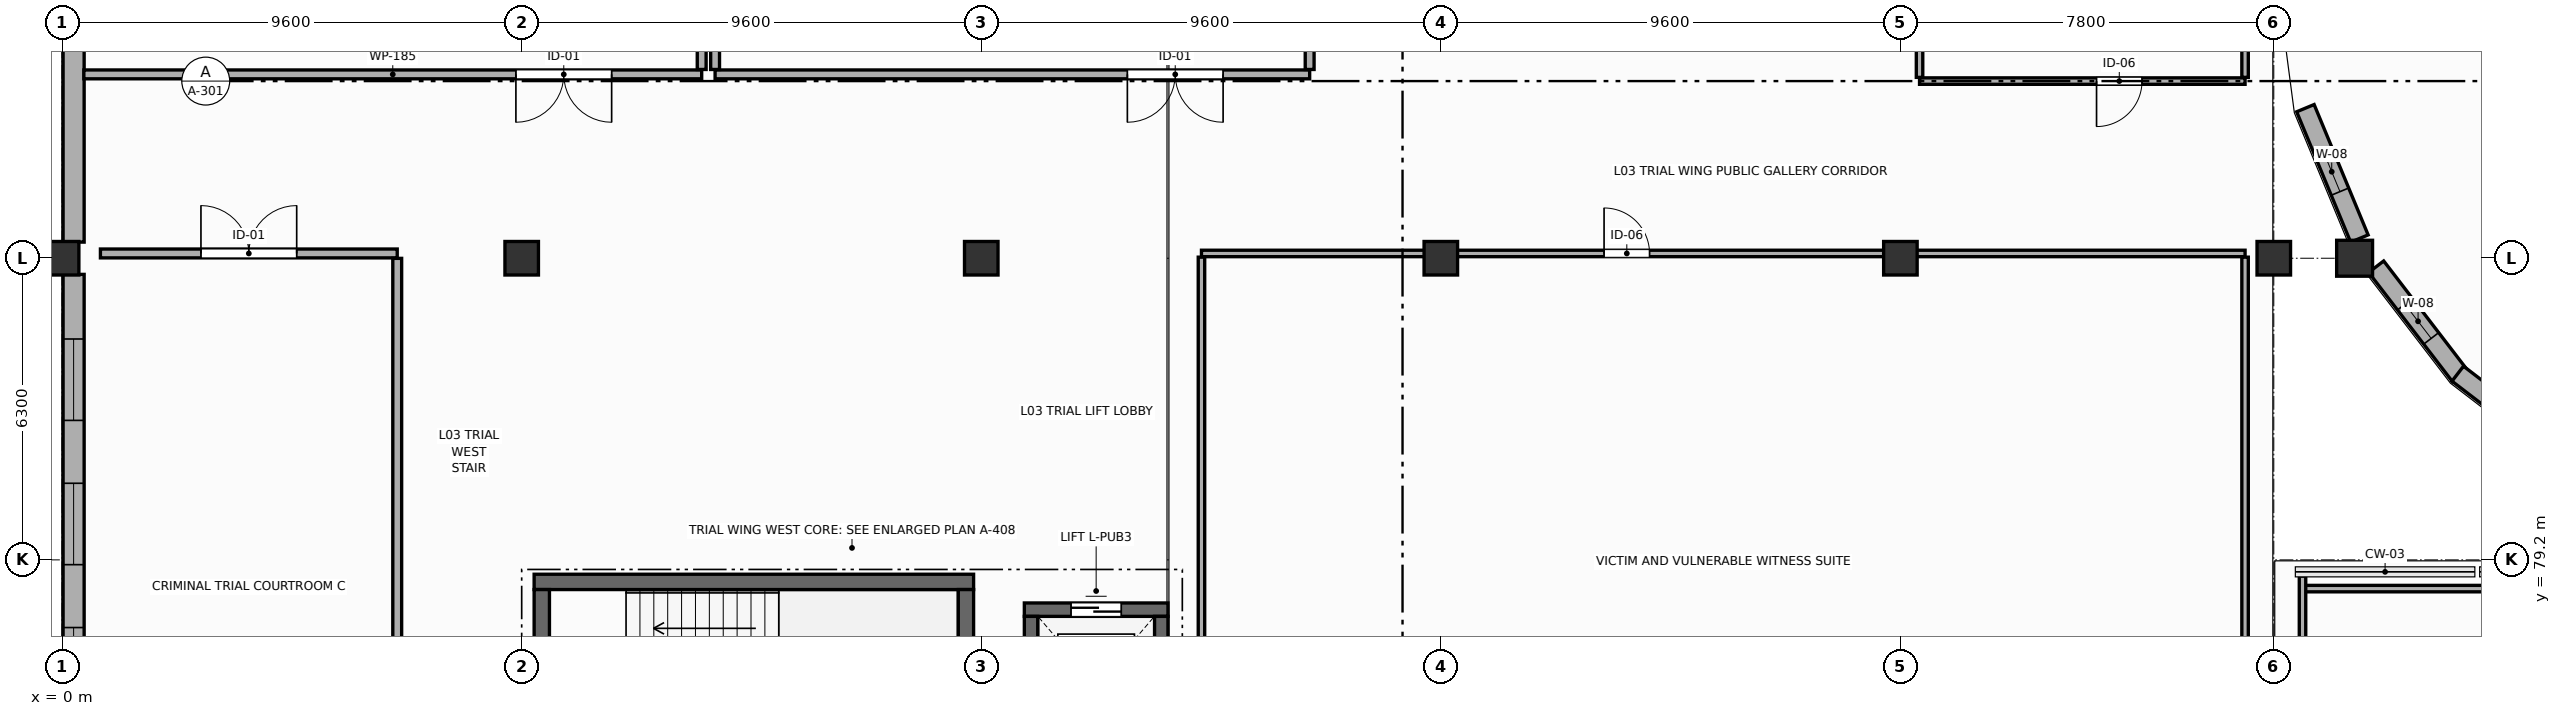
"""IFC4 building model, lengths in metres.
Left out: names, types, materials, properties, quantities, classifications, styles, units other than length and angle.
Written with IfcOpenShell. Run it as: python <this file> out.ifc"""

import sys

from ifc_helpers import new_model, si_unit, direction, frame, frame_2d, origin, origin_2d, place, context, subcontext, project, spatial, rectangle, circle, extrude, element, fill, save


model = new_model("IFC4")
c1 = context("Model", 3, precision=1e-05, world=origin(), true_north=direction((0.0, 1.0)))
c2 = subcontext(c1, "Body", "Model", "MODEL_VIEW")
j1 = project(units=[si_unit("LENGTHUNIT", "METRE"), si_unit("PLANEANGLEUNIT", "RADIAN")], contexts=[c1])
p1 = place(None, origin())
s1 = spatial("IfcSite", under=j1, at=p1, CompositionType="ELEMENT")
p2 = place(p1, origin())
s2 = spatial("IfcBuilding", under=s1, at=p2, CompositionType="ELEMENT")
p3 = place(p2, frame((0.0, 0.0, 9.9)))
s3 = spatial("IfcBuildingStorey", under=s2, at=p3, CompositionType="ELEMENT", Elevation=9.9)
p4 = place(p3, frame((47.888, 85.5, 0.0), z_axis=(0.0, 0.0, 1.0), x_axis=(1.0, 0.0, 0.0)))
e1 = element("IfcColumn", 1, at=p4, inside=s3, PredefinedType="COLUMN", context=c2, shape_type="SweptSolid", body=[
    extrude(circle(Radius=0.375, at=origin_2d()), origin(), (0.0, 0.0, 1.0), 4.5),
])
for number, where, z_axis, x_axis in (
    (2, (0.0, 85.5, 0.0), (0.0, 0.0, 1.0), (1.0, 0.0, 0.0)),
    (3, (9.6, 85.5, 0.0), (0.0, 0.0, 1.0), (1.0, 0.0, 0.0)),
    (4, (19.2, 85.5, 0.0), (0.0, 0.0, 1.0), (1.0, 0.0, 0.0)),
    (5, (28.8, 85.5, 0.0), (0.0, 0.0, 1.0), (1.0, 0.0, 0.0)),
    (6, (38.4, 85.5, 0.0), (0.0, 0.0, 1.0), (1.0, 0.0, 0.0)),
    (7, (46.2, 85.5, 0.0), (0.0, 0.0, 1.0), (1.0, 0.0, 0.0)),
):
    element("IfcColumn", number, at=place(p3, frame(where, z_axis=z_axis, x_axis=x_axis)), inside=s3, PredefinedType="COLUMN", context=c2, shape_type="SweptSolid", body=[
        extrude(rectangle(XDim=0.7, YDim=0.7, at=origin_2d()), origin(), (0.0, 0.0, 1.0), 4.5),
    ])
p5 = place(p3, frame((46.86, 88.635, 0.0), z_axis=(0.0, 0.0, 1.0), x_axis=(0.382632249505, -0.923900731485, 0.0)))
e8 = element("IfcWall", 8, at=p5, inside=s3, PredefinedType="ELEMENTEDWALL", context=c2, shape_type="SweptSolid", body=[
    extrude(rectangle(XDim=2.947, YDim=0.395, at=frame_2d((1.474, 0.0))), origin(), (0.0, 0.0, 1.0), 3.38),
])
p6 = place(p5, frame((0.987, 0.0, 0.85)))
e9 = element("IfcOpeningElement", 9, at=p6, cuts=e8, PredefinedType="OPENING", context=c2, shape_type="SweptSolid", body=[
    extrude(rectangle(XDim=0.9, YDim=1.85, at=frame_2d((0.45, 0.925))), frame((0.0, 0.208, 0.0), z_axis=(0.0, -1.0, 0.0), x_axis=(1.0, 0.0, 0.0)), (0.0, 0.0, 1.0), 0.415),
])
p7 = place(p3, frame((48.339, 85.323, 0.0), z_axis=(0.0, 0.0, 1.0), x_axis=(0.608729278603, -0.79337800913, 0.0)))
e10 = element("IfcWall", 10, at=p7, inside=s3, PredefinedType="ELEMENTEDWALL", context=c2, shape_type="SweptSolid", body=[
    extrude(rectangle(XDim=2.875, YDim=0.395, at=frame_2d((1.437, 0.0))), origin(), (0.0, 0.0, 1.0), 3.38),
])
p8 = place(p7, frame((0.987, 0.0, 0.85)))
e11 = element("IfcOpeningElement", 11, at=p8, cuts=e10, PredefinedType="OPENING", context=c2, shape_type="SweptSolid", body=[
    extrude(rectangle(XDim=0.9, YDim=1.85, at=frame_2d((0.45, 0.925))), frame((0.0, 0.208, 0.0), z_axis=(0.0, -1.0, 0.0), x_axis=(1.0, 0.0, 0.0)), (0.0, 0.0, 1.0), 0.415),
])
p9 = place(p3, frame((50.043, 83.089, 0.0), z_axis=(0.0, 0.0, 1.0), x_axis=(0.793346533164, -0.608770300127, 0.0)))
e12 = element("IfcWall", 12, at=p9, inside=s3, PredefinedType="ELEMENTEDWALL", context=c2, shape_type="SweptSolid", body=[
    extrude(rectangle(XDim=2.874, YDim=0.395, at=frame_2d((1.437, 0.0))), origin(), (0.0, 0.0, 1.0), 3.28),
])
p10 = place(p9, frame((0.987, 0.0, 0.85)))
e13 = element("IfcOpeningElement", 13, at=p10, cuts=e12, PredefinedType="OPENING", context=c2, shape_type="SweptSolid", body=[
    extrude(rectangle(XDim=0.9, YDim=1.85, at=frame_2d((0.45, 0.925))), frame((0.0, 0.208, 0.0), z_axis=(0.0, -1.0, 0.0), x_axis=(1.0, 0.0, 0.0)), (0.0, 0.0, 1.0), 0.415),
])
p11 = place(p3, frame((0.24, 74.742, 0.0), z_axis=(0.0, 0.0, 1.0), x_axis=(0.0, 1.0, 0.0)))
e14 = element("IfcWall", 14, at=p11, inside=s3, PredefinedType="STANDARD", context=c2, shape_type="SweptSolid", body=[
    extrude(rectangle(XDim=10.421, YDim=0.44, at=frame_2d((5.21, 0.0))), origin(), (0.0, 0.0, 1.0), 3.38),
])
p12 = place(p11, frame((1.345, 0.0, 0.85)))
e15 = element("IfcOpeningElement", 15, at=p12, cuts=e14, PredefinedType="OPENING", context=c2, shape_type="SweptSolid", body=[
    extrude(rectangle(XDim=1.7, YDim=2.3, at=frame_2d((0.85, 1.15))), frame((0.0, 0.23, 0.0), z_axis=(0.0, -1.0, 0.0), x_axis=(1.0, 0.0, 0.0)), (0.0, 0.0, 1.0), 0.46),
])
p13 = place(p11, frame((4.358, 0.0, 0.85)))
e16 = element("IfcOpeningElement", 16, at=p13, cuts=e14, PredefinedType="OPENING", context=c2, shape_type="SweptSolid", body=[
    extrude(rectangle(XDim=1.7, YDim=2.3, at=frame_2d((0.85, 1.15))), frame((0.0, 0.23, 0.0), z_axis=(0.0, -1.0, 0.0), x_axis=(1.0, 0.0, 0.0)), (0.0, 0.0, 1.0), 0.46),
])
p14 = place(p11, frame((7.371, 0.0, 0.85)))
e17 = element("IfcOpeningElement", 17, at=p14, cuts=e14, PredefinedType="OPENING", context=c2, shape_type="SweptSolid", body=[
    extrude(rectangle(XDim=1.7, YDim=2.3, at=frame_2d((0.85, 1.15))), frame((0.0, 0.23, 0.0), z_axis=(0.0, -1.0, 0.0), x_axis=(1.0, 0.0, 0.0)), (0.0, 0.0, 1.0), 0.46),
])
p15 = place(p3, frame((0.24, 85.837, 0.0), z_axis=(0.0, 0.0, 1.0), x_axis=(0.0, 1.0, 0.0)))
e18 = element("IfcWall", 18, at=p15, inside=s3, PredefinedType="STANDARD", context=c2, shape_type="SweptSolid", body=[
    extrude(rectangle(XDim=11.921, YDim=0.44, at=frame_2d((5.96, 0.0))), origin(), (0.0, 0.0, 1.0), 3.33),
])
p16 = place(p15, frame((5.113, 0.0, 0.85)))
e19 = element("IfcOpeningElement", 19, at=p16, cuts=e18, PredefinedType="OPENING", context=c2, shape_type="SweptSolid", body=[
    extrude(rectangle(XDim=1.7, YDim=2.3, at=frame_2d((0.85, 1.15))), frame((0.0, 0.23, 0.0), z_axis=(0.0, -1.0, 0.0), x_axis=(1.0, 0.0, 0.0)), (0.0, 0.0, 1.0), 0.46),
])
p17 = place(p15, frame((8.626, 0.0, 0.85)))
e20 = element("IfcOpeningElement", 20, at=p17, cuts=e18, PredefinedType="OPENING", context=c2, shape_type="SweptSolid", body=[
    extrude(rectangle(XDim=1.7, YDim=2.3, at=frame_2d((0.85, 1.15))), frame((0.0, 0.23, 0.0), z_axis=(0.0, -1.0, 0.0), x_axis=(1.0, 0.0, 0.0)), (0.0, 0.0, 1.0), 0.46),
])
p18 = place(p3, frame((9.86, 78.74, 0.0), z_axis=(0.0, 0.0, 1.0), x_axis=(1.0, 0.0, 0.0)))
e21 = element("IfcWall", 21, at=p18, inside=s3, PredefinedType="SHEAR", context=c2, shape_type="SweptSolid", body=[
    extrude(rectangle(XDim=9.18, YDim=0.32, at=frame_2d((4.59, 0.0))), origin(), (0.0, 0.0, 1.0), 4.25),
])
p19 = place(p3, frame((10.02, 75.18, 0.0), z_axis=(0.0, 0.0, 1.0), x_axis=(0.0, 1.0, 0.0)))
e22 = element("IfcWall", 22, at=p19, inside=s3, PredefinedType="SHEAR", context=c2, shape_type="SweptSolid", body=[
    extrude(rectangle(XDim=3.4, YDim=0.32, at=frame_2d((1.7, 0.0))), origin(), (0.0, 0.0, 1.0), 4.25),
])
p20 = place(p19, frame((1.125, 0.0, 0.0)))
e23 = element("IfcOpeningElement", 23, at=p20, cuts=e22, PredefinedType="OPENING", context=c2, shape_type="SweptSolid", body=[
    extrude(rectangle(XDim=1.15, YDim=2.2, at=frame_2d((0.575, 1.1))), frame((0.0, 0.17, 0.0), z_axis=(0.0, -1.0, 0.0), x_axis=(1.0, 0.0, 0.0)), (0.0, 0.0, 1.0), 0.34),
])
p21 = place(p3, frame((18.88, 78.58, 0.0), z_axis=(0.0, 0.0, 1.0), x_axis=(0.0, -1.0, 0.0)))
e24 = element("IfcWall", 24, at=p21, inside=s3, PredefinedType="SHEAR", context=c2, shape_type="SweptSolid", body=[
    extrude(rectangle(XDim=3.4, YDim=0.32, at=frame_2d((1.7, 0.0))), origin(), (0.0, 0.0, 1.0), 4.25),
])
p22 = place(p3, frame((20.1, 78.16, 0.0), z_axis=(0.0, 0.0, 1.0), x_axis=(1.0, 0.0, 0.0)))
e25 = element("IfcWall", 25, at=p22, inside=s3, PredefinedType="SHEAR", context=c2, shape_type="SweptSolid", body=[
    extrude(rectangle(XDim=3.0, YDim=0.28, at=frame_2d((1.5, 0.0))), origin(), (0.0, 0.0, 1.0), 4.25),
])
p23 = place(p22, frame((0.975, 0.0, 0.0)))
e26 = element("IfcOpeningElement", 26, at=p23, cuts=e25, PredefinedType="OPENING", context=c2, shape_type="SweptSolid", body=[
    extrude(rectangle(XDim=1.05, YDim=2.2, at=frame_2d((0.525, 1.1))), frame((0.0, 0.15, 0.0), z_axis=(0.0, -1.0, 0.0), x_axis=(1.0, 0.0, 0.0)), (0.0, 0.0, 1.0), 0.3),
])
for number, where, z_axis, x_axis in (
    (27, (20.24, 75.18, 0.0), (0.0, 0.0, 1.0), (0.0, 1.0, 0.0)),
    (28, (22.96, 78.02, 0.0), (0.0, 0.0, 1.0), (0.0, -1.0, 0.0)),
):
    element("IfcWall", number, at=place(p3, frame(where, z_axis=z_axis, x_axis=x_axis)), inside=s3, PredefinedType="SHEAR", context=c2, shape_type="SweptSolid", body=[
        extrude(rectangle(XDim=2.84, YDim=0.28, at=frame_2d((1.42, 0.0))), origin(), (0.0, 0.0, 1.0), 4.25),
    ])
p24 = place(p3, frame((13.36, 89.34, 0.0), z_axis=(0.0, 0.0, 1.0), x_axis=(-1.0, 0.0, 0.0)))
e29 = element("IfcWall", 29, at=p24, inside=s3, PredefinedType="PARTITIONING", context=c2, shape_type="SweptSolid", body=[
    extrude(rectangle(XDim=12.906, YDim=0.185, at=frame_2d((6.453, 0.0))), origin(), (0.0, 0.0, 1.0), 3.38),
])
p25 = place(p24, frame((1.881, 0.0, 0.0)))
e30 = element("IfcOpeningElement", 30, at=p25, cuts=e29, PredefinedType="OPENING", context=c2, shape_type="SweptSolid", body=[
    extrude(rectangle(XDim=2.0, YDim=2.5, at=frame_2d((1.0, 1.25))), frame((0.0, 0.103, 0.0), z_axis=(0.0, -1.0, 0.0), x_axis=(1.0, 0.0, 0.0)), (0.0, 0.0, 1.0), 0.205),
])
p26 = place(p3, frame((13.36, 112.346, 0.0), z_axis=(0.0, 0.0, 1.0), x_axis=(0.0, -1.0, 0.0)))
e31 = element("IfcWall", 31, at=p26, inside=s3, PredefinedType="PARTITIONING", context=c2, shape_type="SweptSolid", body=[
    extrude(rectangle(XDim=22.904, YDim=0.185, at=frame_2d((11.452, 0.0))), origin(), (0.0, 0.0, 1.0), 3.58),
])
p27 = place(p3, frame((26.06, 89.34, 0.0), z_axis=(0.0, 0.0, 1.0), x_axis=(-1.0, 0.0, 0.0)))
e32 = element("IfcWall", 32, at=p27, inside=s3, PredefinedType="PARTITIONING", context=c2, shape_type="SweptSolid", body=[
    extrude(rectangle(XDim=12.42, YDim=0.185, at=frame_2d((6.21, 0.0))), origin(), (0.0, 0.0, 1.0), 3.38),
])
p28 = place(p27, frame((1.808, 0.0, 0.0)))
e33 = element("IfcOpeningElement", 33, at=p28, cuts=e32, PredefinedType="OPENING", context=c2, shape_type="SweptSolid", body=[
    extrude(rectangle(XDim=2.0, YDim=2.5, at=frame_2d((1.0, 1.25))), frame((0.0, 0.103, 0.0), z_axis=(0.0, -1.0, 0.0), x_axis=(1.0, 0.0, 0.0)), (0.0, 0.0, 1.0), 0.205),
])
for number, where, z_axis, x_axis in (
    (34, (13.64, 89.442, 0.0), (0.0, 0.0, 1.0), (0.0, 1.0, 0.0)),
    (35, (26.06, 97.597, 0.0), (0.0, 0.0, 1.0), (0.0, -1.0, 0.0)),
):
    element("IfcWall", number, at=place(p3, frame(where, z_axis=z_axis, x_axis=x_axis)), inside=s3, PredefinedType="PARTITIONING", context=c2, shape_type="SweptSolid", body=[
        extrude(rectangle(XDim=8.155, YDim=0.185, at=frame_2d((4.078, 0.0))), origin(), (0.0, 0.0, 1.0), 3.63),
    ])
p29 = place(p3, frame((45.6, 89.2, 0.0), z_axis=(0.0, 0.0, 1.0), x_axis=(-1.0, 0.0, 0.0)))
e36 = element("IfcWall", 36, at=p29, inside=s3, PredefinedType="PARTITIONING", context=c2, shape_type="SweptSolid", body=[
    extrude(rectangle(XDim=6.8, YDim=0.135, at=frame_2d((3.4, 0.0))), origin(), (0.0, 0.0, 1.0), 3.38),
])
p30 = place(p29, frame((2.153, 0.0, 0.0)))
e37 = element("IfcOpeningElement", 37, at=p30, cuts=e36, PredefinedType="OPENING", context=c2, shape_type="SweptSolid", body=[
    extrude(rectangle(XDim=0.95, YDim=2.15, at=frame_2d((0.475, 1.075))), frame((0.0, 0.077, 0.0), z_axis=(0.0, -1.0, 0.0), x_axis=(1.0, 0.0, 0.0)), (0.0, 0.0, 1.0), 0.155),
])
p31 = place(p3, frame((38.8, 89.278, 0.0), z_axis=(0.0, 0.0, 1.0), x_axis=(0.0, 1.0, 0.0)))
e38 = element("IfcWall", 38, at=p31, inside=s3, PredefinedType="PARTITIONING", context=c2, shape_type="SweptSolid", body=[
    extrude(rectangle(XDim=12.645, YDim=0.135, at=frame_2d((6.323, 0.0))), origin(), (0.0, 0.0, 1.0), 3.33),
])
p32 = place(p3, frame((45.6, 101.923, 0.0), z_axis=(0.0, 0.0, 1.0), x_axis=(0.0, -1.0, 0.0)))
e39 = element("IfcWall", 39, at=p32, inside=s3, PredefinedType="PARTITIONING", context=c2, shape_type="SweptSolid", body=[
    extrude(rectangle(XDim=12.645, YDim=0.135, at=frame_2d((6.323, 0.0))), origin(), (0.0, 0.0, 1.0), 3.63),
])
p33 = place(p3, frame((0.8, 85.6, 0.0), z_axis=(0.0, 0.0, 1.0), x_axis=(1.0, 0.0, 0.0)))
e40 = element("IfcWall", 40, at=p33, inside=s3, PredefinedType="PARTITIONING", context=c2, shape_type="SweptSolid", body=[
    extrude(rectangle(XDim=6.2, YDim=0.185, at=frame_2d((3.1, 0.0))), origin(), (0.0, 0.0, 1.0), 3.58),
])
p34 = place(p33, frame((2.1, 0.0, 0.0)))
e41 = element("IfcOpeningElement", 41, at=p34, cuts=e40, PredefinedType="OPENING", context=c2, shape_type="SweptSolid", body=[
    extrude(rectangle(XDim=2.0, YDim=2.5, at=frame_2d((1.0, 1.25))), frame((0.0, 0.103, 0.0), z_axis=(0.0, -1.0, 0.0), x_axis=(1.0, 0.0, 0.0)), (0.0, 0.0, 1.0), 0.205),
])
p35 = place(p3, frame((7.0, 85.498, 0.0), z_axis=(0.0, 0.0, 1.0), x_axis=(0.0, -1.0, 0.0)))
e42 = element("IfcWall", 42, at=p35, inside=s3, PredefinedType="PARTITIONING", context=c2, shape_type="SweptSolid", body=[
    extrude(rectangle(XDim=17.595, YDim=0.185, at=frame_2d((8.797, 0.0))), origin(), (0.0, 0.0, 1.0), 3.58),
])
p36 = place(p3, frame((23.8, 85.6, 0.0), z_axis=(0.0, 0.0, 1.0), x_axis=(1.0, 0.0, 0.0)))
e43 = element("IfcWall", 43, at=p36, inside=s3, PredefinedType="PARTITIONING", context=c2, shape_type="SweptSolid", body=[
    extrude(rectangle(XDim=21.8, YDim=0.135, at=frame_2d((10.9, 0.0))), origin(), (0.0, 0.0, 1.0), 3.38),
])
p37 = place(p36, frame((8.41, 0.0, 0.0)))
e44 = element("IfcOpeningElement", 44, at=p37, cuts=e43, PredefinedType="OPENING", context=c2, shape_type="SweptSolid", body=[
    extrude(rectangle(XDim=0.95, YDim=2.15, at=frame_2d((0.475, 1.075))), frame((0.0, 0.077, 0.0), z_axis=(0.0, -1.0, 0.0), x_axis=(1.0, 0.0, 0.0)), (0.0, 0.0, 1.0), 0.155),
])
p38 = place(p3, frame((23.8, 67.877, 0.0), z_axis=(0.0, 0.0, 1.0), x_axis=(0.0, 1.0, 0.0)))
e45 = element("IfcWall", 45, at=p38, inside=s3, PredefinedType="PARTITIONING", context=c2, shape_type="SweptSolid", body=[
    extrude(rectangle(XDim=17.645, YDim=0.135, at=frame_2d((8.823, 0.0))), origin(), (0.0, 0.0, 1.0), 3.58),
])
p39 = place(p3, frame((45.6, 85.522, 0.0), z_axis=(0.0, 0.0, 1.0), x_axis=(0.0, -1.0, 0.0)))
e46 = element("IfcWall", 46, at=p39, inside=s3, PredefinedType="PARTITIONING", context=c2, shape_type="SweptSolid", body=[
    extrude(rectangle(XDim=18.348, YDim=0.135, at=frame_2d((9.174, 0.0))), origin(), (0.0, 0.0, 1.0), 3.68),
])
p40 = place(p3, frame((46.8, 78.6, 0.0), z_axis=(0.0, 0.0, 1.0), x_axis=(1.0, 0.0, 0.0)))
e47 = element("IfcWall", 47, at=p40, inside=s3, PredefinedType="PARTITIONING", context=c2, shape_type="SweptSolid", body=[
    extrude(rectangle(XDim=9.6, YDim=0.135, at=frame_2d((4.8, 0.0))), origin(), (0.0, 0.0, 1.0), 4.235),
])
p41 = place(p3, frame((46.8, 70.877, 0.0), z_axis=(0.0, 0.0, 1.0), x_axis=(0.0, 1.0, 0.0)))
e48 = element("IfcWall", 48, at=p41, inside=s3, PredefinedType="PARTITIONING", context=c2, shape_type="SweptSolid", body=[
    extrude(rectangle(XDim=7.983, YDim=0.135, at=frame_2d((3.991, 0.0))), origin(), (0.0, 0.0, 1.0), 3.38),
])
p42 = place(p6, origin())
e49 = element("IfcWindow", 49, at=p42, inside=s3, PartitioningType="SINGLE_PANEL", PredefinedType="WINDOW", context=c2, shape_type="SweptSolid", body=[
    extrude(rectangle(XDim=0.9, YDim=1.85, at=frame_2d((0.45, 0.925))), frame((0.0, 0.03, 0.0), z_axis=(0.0, -1.0, 0.0), x_axis=(1.0, 0.0, 0.0)), (0.0, 0.0, 1.0), 0.06),
])
fill(e9, e49)
p43 = place(p8, origin())
e50 = element("IfcWindow", 50, at=p43, inside=s3, PartitioningType="SINGLE_PANEL", PredefinedType="WINDOW", context=c2, shape_type="SweptSolid", body=[
    extrude(rectangle(XDim=0.9, YDim=1.85, at=frame_2d((0.45, 0.925))), frame((0.0, 0.03, 0.0), z_axis=(0.0, -1.0, 0.0), x_axis=(1.0, 0.0, 0.0)), (0.0, 0.0, 1.0), 0.06),
])
fill(e11, e50)
p44 = place(p12, origin())
e51 = element("IfcWindow", 51, at=p44, inside=s3, PartitioningType="SINGLE_PANEL", PredefinedType="WINDOW", context=c2, shape_type="SweptSolid", body=[
    extrude(rectangle(XDim=1.7, YDim=2.3, at=frame_2d((0.85, 1.15))), frame((0.0, 0.03, 0.0), z_axis=(0.0, -1.0, 0.0), x_axis=(1.0, 0.0, 0.0)), (0.0, 0.0, 1.0), 0.06),
])
fill(e15, e51)
p45 = place(p13, origin())
e52 = element("IfcWindow", 52, at=p45, inside=s3, PartitioningType="SINGLE_PANEL", PredefinedType="WINDOW", context=c2, shape_type="SweptSolid", body=[
    extrude(rectangle(XDim=1.7, YDim=2.3, at=frame_2d((0.85, 1.15))), frame((0.0, 0.03, 0.0), z_axis=(0.0, -1.0, 0.0), x_axis=(1.0, 0.0, 0.0)), (0.0, 0.0, 1.0), 0.06),
])
fill(e16, e52)
p46 = place(p14, origin())
e53 = element("IfcWindow", 53, at=p46, inside=s3, PartitioningType="SINGLE_PANEL", PredefinedType="WINDOW", context=c2, shape_type="SweptSolid", body=[
    extrude(rectangle(XDim=1.7, YDim=2.3, at=frame_2d((0.85, 1.15))), frame((0.0, 0.03, 0.0), z_axis=(0.0, -1.0, 0.0), x_axis=(1.0, 0.0, 0.0)), (0.0, 0.0, 1.0), 0.06),
])
fill(e17, e53)
p47 = place(p23, origin())
e54 = element("IfcDoor", 54, at=p47, inside=s3, OperationType="DOUBLE_DOOR_SLIDING", PredefinedType="DOOR", context=c2, shape_type="SweptSolid", body=[
    extrude(rectangle(XDim=1.05, YDim=2.2, at=frame_2d((0.525, 1.1))), frame((0.0, 0.025, 0.0), z_axis=(0.0, -1.0, 0.0), x_axis=(1.0, 0.0, 0.0)), (0.0, 0.0, 1.0), 0.05),
])
fill(e26, e54)
p48 = place(p25, origin())
e55 = element("IfcDoor", 55, at=p48, inside=s3, OperationType="DOUBLE_DOOR_SINGLE_SWING", PredefinedType="DOOR", context=c2, shape_type="SweptSolid", body=[
    extrude(rectangle(XDim=2.0, YDim=2.5, at=frame_2d((1.0, 1.25))), frame((0.0, 0.025, 0.0), z_axis=(0.0, -1.0, 0.0), x_axis=(1.0, 0.0, 0.0)), (0.0, 0.0, 1.0), 0.05),
])
fill(e30, e55)
p49 = place(p28, origin())
e56 = element("IfcDoor", 56, at=p49, inside=s3, OperationType="DOUBLE_DOOR_SINGLE_SWING", PredefinedType="DOOR", context=c2, shape_type="SweptSolid", body=[
    extrude(rectangle(XDim=2.0, YDim=2.5, at=frame_2d((1.0, 1.25))), frame((0.0, 0.025, 0.0), z_axis=(0.0, -1.0, 0.0), x_axis=(1.0, 0.0, 0.0)), (0.0, 0.0, 1.0), 0.05),
])
fill(e33, e56)
p50 = place(p30, origin())
e57 = element("IfcDoor", 57, at=p50, inside=s3, OperationType="SINGLE_SWING_RIGHT", PredefinedType="DOOR", context=c2, shape_type="SweptSolid", body=[
    extrude(rectangle(XDim=0.95, YDim=2.15, at=frame_2d((0.475, 1.075))), frame((0.0, 0.025, 0.0), z_axis=(0.0, -1.0, 0.0), x_axis=(1.0, 0.0, 0.0)), (0.0, 0.0, 1.0), 0.05),
])
fill(e37, e57)
p51 = place(p34, origin())
e58 = element("IfcDoor", 58, at=p51, inside=s3, OperationType="DOUBLE_DOOR_SINGLE_SWING", PredefinedType="DOOR", context=c2, shape_type="SweptSolid", body=[
    extrude(rectangle(XDim=2.0, YDim=2.5, at=frame_2d((1.0, 1.25))), frame((0.0, 0.025, 0.0), z_axis=(0.0, -1.0, 0.0), x_axis=(1.0, 0.0, 0.0)), (0.0, 0.0, 1.0), 0.05),
])
fill(e41, e58)
p52 = place(p37, origin())
e59 = element("IfcDoor", 59, at=p52, inside=s3, OperationType="SINGLE_SWING_LEFT", PredefinedType="DOOR", context=c2, shape_type="SweptSolid", body=[
    extrude(rectangle(XDim=0.95, YDim=2.15, at=frame_2d((0.475, 1.075))), frame((0.0, 0.025, 0.0), z_axis=(0.0, -1.0, 0.0), x_axis=(1.0, 0.0, 0.0)), (0.0, 0.0, 1.0), 0.05),
])
fill(e44, e59)
save(model, sys.argv[1])
